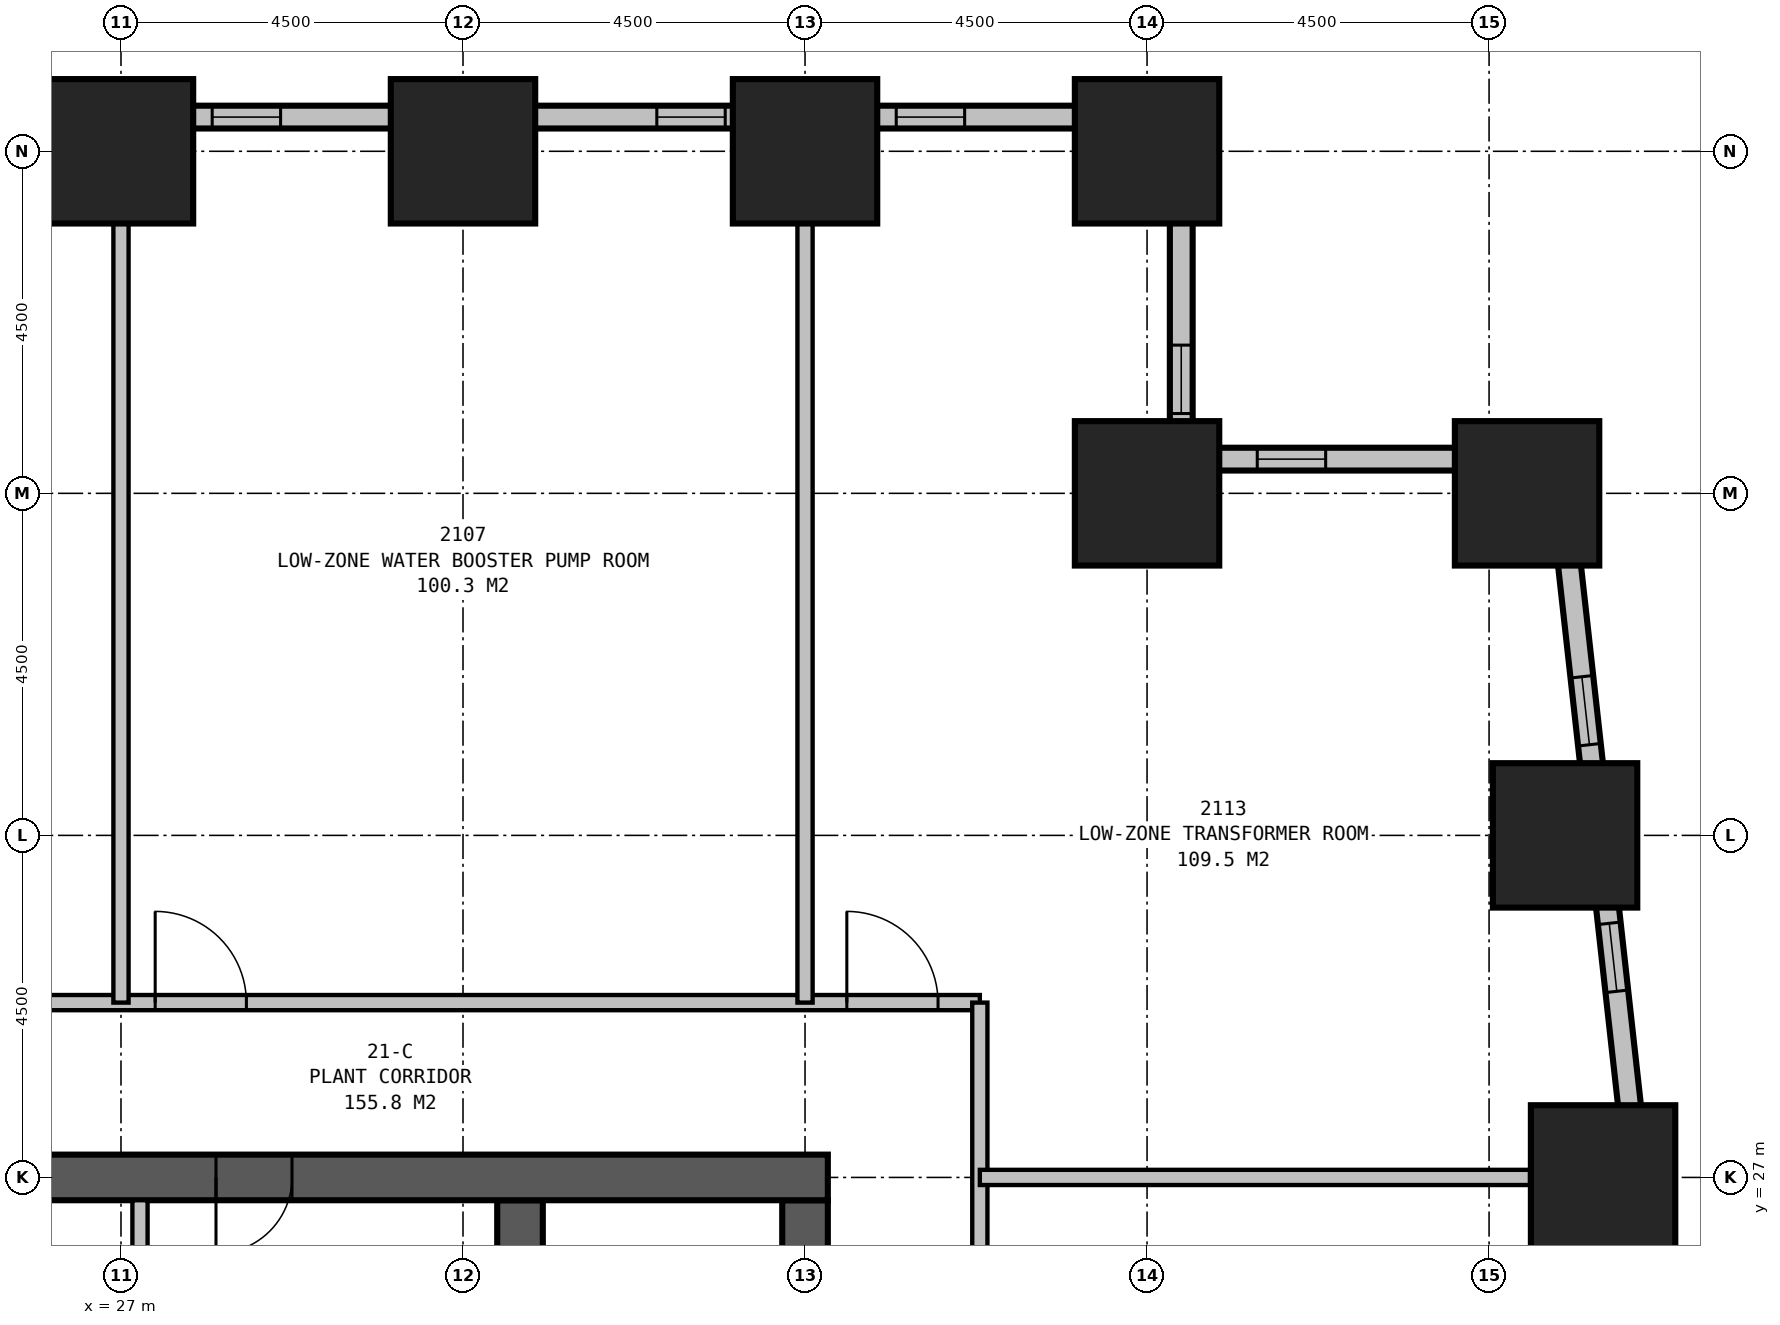
"""IFC4 building model, lengths in metres.
Left out: names, types, materials, properties, quantities, classifications, styles, units other than length and angle.
Written with IfcOpenShell. Run it as: python <this file> out.ifc"""

import sys

from ifc_helpers import new_model, si_unit, direction, frame, frame_2d, origin, origin_2d, place, context, subcontext, project, spatial, rectangle, extrude, element, fill, save


model = new_model("IFC4")
c1 = context("Model", 3, precision=1e-05, world=origin(), true_north=direction((0.0, 1.0)))
c2 = subcontext(c1, "Body", "Model", "MODEL_VIEW")
j1 = project(units=[si_unit("LENGTHUNIT", "METRE"), si_unit("PLANEANGLEUNIT", "RADIAN")], contexts=[c1])
p1 = place(None, origin())
s1 = spatial("IfcSite", under=j1, at=p1, CompositionType="ELEMENT")
p2 = place(p1, origin())
s2 = spatial("IfcBuilding", under=s1, at=p2, CompositionType="ELEMENT")
p3 = place(p2, frame((0.0, 0.0, 85.7)))
s3 = spatial("IfcBuildingStorey", under=s2, at=p3, CompositionType="ELEMENT", Elevation=85.7)
for number, where, z_axis, x_axis in (
    (1, (46.5, 27.0, 0.0), (0.0, 0.0, 1.0), (1.0, 0.0, 0.0)),
    (2, (46.0, 31.5, 0.0), (0.0, 0.0, 1.0), (1.0, 0.0, 0.0)),
    (3, (45.5, 36.0, 0.0), (0.0, 0.0, 1.0), (1.0, 0.0, 0.0)),
    (4, (40.5, 36.0, 0.0), (0.0, 0.0, 1.0), (1.0, 0.0, 0.0)),
    (5, (40.5, 40.5, 0.0), (0.0, 0.0, 1.0), (1.0, 0.0, 0.0)),
    (6, (36.0, 40.5, 0.0), (0.0, 0.0, 1.0), (1.0, 0.0, 0.0)),
    (7, (31.5, 40.5, 0.0), (0.0, 0.0, 1.0), (1.0, 0.0, 0.0)),
    (8, (27.0, 40.5, 0.0), (0.0, 0.0, 1.0), (1.0, 0.0, 0.0)),
):
    element("IfcColumn", number, at=place(p3, frame(where, z_axis=z_axis, x_axis=x_axis)), inside=s3, PredefinedType="COLUMN", context=c2, shape_type="SweptSolid", body=[
        extrude(rectangle(XDim=1.9, YDim=1.9, at=origin_2d()), origin(), (0.0, 0.0, 1.0), 4.2),
    ])
p4 = place(p3, frame((36.3, 27.0, 0.0), z_axis=(0.0, 0.0, 1.0), x_axis=(-1.0, 0.0, 0.0)))
e9 = element("IfcWall", 9, at=p4, inside=s3, PredefinedType="SHEAR", context=c2, shape_type="SweptSolid", body=[
    extrude(rectangle(XDim=23.1, YDim=0.6, at=frame_2d((11.55, 0.0))), origin(), (0.0, 0.0, 1.0), 4.2),
])
p5 = place(p4, frame((17.05, 0.0, 0.0)))
e10 = element("IfcOpeningElement", 10, at=p5, cuts=e9, PredefinedType="OPENING", context=c2, shape_type="SweptSolid", body=[
    extrude(rectangle(XDim=1.0, YDim=2.1, at=frame_2d((0.5, 1.05))), frame((0.0, 0.31, 0.0), z_axis=(0.0, -1.0, 0.0), x_axis=(1.0, 0.0, 0.0)), (0.0, 0.0, 1.0), 0.62),
])
p6 = place(p4, frame((12.05, 0.0, 0.0)))
e11 = element("IfcOpeningElement", 11, at=p6, cuts=e9, PredefinedType="OPENING", context=c2, shape_type="SweptSolid", body=[
    extrude(rectangle(XDim=1.0, YDim=2.1, at=frame_2d((0.5, 1.05))), frame((0.0, 0.31, 0.0), z_axis=(0.0, -1.0, 0.0), x_axis=(1.0, 0.0, 0.0)), (0.0, 0.0, 1.0), 0.62),
])
p7 = place(p4, frame((7.05, 0.0, 0.0)))
e12 = element("IfcOpeningElement", 12, at=p7, cuts=e9, PredefinedType="OPENING", context=c2, shape_type="SweptSolid", body=[
    extrude(rectangle(XDim=1.0, YDim=2.1, at=frame_2d((0.5, 1.05))), frame((0.0, 0.31, 0.0), z_axis=(0.0, -1.0, 0.0), x_axis=(1.0, 0.0, 0.0)), (0.0, 0.0, 1.0), 0.62),
])
p8 = place(p3, frame((32.25, 13.8, 0.0), z_axis=(0.0, 0.0, 1.0), x_axis=(0.0, 1.0, 0.0)))
e13 = element("IfcWall", 13, at=p8, inside=s3, PredefinedType="SHEAR", context=c2, shape_type="SweptSolid", body=[
    extrude(rectangle(XDim=12.9, YDim=0.6, at=frame_2d((6.45, 0.0))), origin(), (0.0, 0.0, 1.0), 4.2),
])
p9 = place(p8, frame((5.05, 0.0, 0.0), z_axis=(0.0, 0.0, 1.0), x_axis=(-1.0, 0.0, 0.0)))
e14 = element("IfcOpeningElement", 14, at=p9, cuts=e13, PredefinedType="OPENING", context=c2, shape_type="SweptSolid", body=[
    extrude(rectangle(XDim=1.2, YDim=2.1, at=frame_2d((0.6, 1.05))), frame((0.0, 0.31, 0.0), z_axis=(0.0, -1.0, 0.0), x_axis=(1.0, 0.0, 0.0)), (0.0, 0.0, 1.0), 0.62),
])
p10 = place(p3, frame((36.0, 20.0, 0.0), z_axis=(0.0, 0.0, 1.0), x_axis=(0.0, 1.0, 0.0)))
e15 = element("IfcWall", 15, at=p10, inside=s3, PredefinedType="SHEAR", context=c2, shape_type="SweptSolid", body=[
    extrude(rectangle(XDim=6.7, YDim=0.6, at=frame_2d((3.35, 0.0))), origin(), (0.0, 0.0, 1.0), 4.2),
])
p11 = place(p3, frame((49.519, 3.901, 0.0), z_axis=(0.0, 0.0, 1.0), x_axis=(-0.110429082637, 0.993884006164, 0.0)))
e16 = element("IfcWall", 16, at=p11, inside=s3, PredefinedType="STANDARD", context=c2, shape_type="SweptSolid", body=[
    extrude(rectangle(XDim=32.899, YDim=0.3, at=frame_2d((16.45, 0.0))), origin(), (0.0, 0.0, 1.0), 2.85),
])
p12 = place(p11, frame((1.803, 0.0, 0.5)))
e17 = element("IfcOpeningElement", 17, at=p12, cuts=e16, PredefinedType="OPENING", context=c2, shape_type="SweptSolid", body=[
    extrude(rectangle(XDim=0.9, YDim=1.2, at=frame_2d((0.45, 0.6))), frame((0.0, 0.16, 0.0), z_axis=(0.0, -1.0, 0.0), x_axis=(1.0, 0.0, 0.0)), (0.0, 0.0, 1.0), 0.32),
])
p13 = place(p11, frame((7.595, 0.0, 0.5)))
e18 = element("IfcOpeningElement", 18, at=p13, cuts=e16, PredefinedType="OPENING", context=c2, shape_type="SweptSolid", body=[
    extrude(rectangle(XDim=0.9, YDim=1.2, at=frame_2d((0.45, 0.6))), frame((0.0, 0.16, 0.0), z_axis=(0.0, -1.0, 0.0), x_axis=(1.0, 0.0, 0.0)), (0.0, 0.0, 1.0), 0.32),
])
p14 = place(p11, frame((10.858, 0.0, 0.5)))
e19 = element("IfcOpeningElement", 19, at=p14, cuts=e16, PredefinedType="OPENING", context=c2, shape_type="SweptSolid", body=[
    extrude(rectangle(XDim=0.9, YDim=1.2, at=frame_2d((0.45, 0.6))), frame((0.0, 0.16, 0.0), z_axis=(0.0, -1.0, 0.0), x_axis=(1.0, 0.0, 0.0)), (0.0, 0.0, 1.0), 0.32),
])
p15 = place(p11, frame((16.65, 0.0, 0.5)))
e20 = element("IfcOpeningElement", 20, at=p15, cuts=e16, PredefinedType="OPENING", context=c2, shape_type="SweptSolid", body=[
    extrude(rectangle(XDim=0.9, YDim=1.2, at=frame_2d((0.45, 0.6))), frame((0.0, 0.16, 0.0), z_axis=(0.0, -1.0, 0.0), x_axis=(1.0, 0.0, 0.0)), (0.0, 0.0, 1.0), 0.32),
])
p16 = place(p11, frame((19.914, 0.0, 0.5)))
e21 = element("IfcOpeningElement", 21, at=p16, cuts=e16, PredefinedType="OPENING", context=c2, shape_type="SweptSolid", body=[
    extrude(rectangle(XDim=0.9, YDim=1.2, at=frame_2d((0.45, 0.6))), frame((0.0, 0.16, 0.0), z_axis=(0.0, -1.0, 0.0), x_axis=(1.0, 0.0, 0.0)), (0.0, 0.0, 1.0), 0.32),
])
p17 = place(p11, frame((25.705, 0.0, 0.5)))
e22 = element("IfcOpeningElement", 22, at=p17, cuts=e16, PredefinedType="OPENING", context=c2, shape_type="SweptSolid", body=[
    extrude(rectangle(XDim=0.9, YDim=1.2, at=frame_2d((0.45, 0.6))), frame((0.0, 0.16, 0.0), z_axis=(0.0, -1.0, 0.0), x_axis=(1.0, 0.0, 0.0)), (0.0, 0.0, 1.0), 0.32),
])
p18 = place(p11, frame((28.969, 0.0, 0.5)))
e23 = element("IfcOpeningElement", 23, at=p18, cuts=e16, PredefinedType="OPENING", context=c2, shape_type="SweptSolid", body=[
    extrude(rectangle(XDim=0.9, YDim=1.2, at=frame_2d((0.45, 0.6))), frame((0.0, 0.16, 0.0), z_axis=(0.0, -1.0, 0.0), x_axis=(1.0, 0.0, 0.0)), (0.0, 0.0, 1.0), 0.32),
])
p19 = place(p3, frame((46.053, 36.45, 0.0), z_axis=(0.0, 0.0, 1.0), x_axis=(-1.0, 0.0, 0.0)))
e24 = element("IfcWall", 24, at=p19, inside=s3, PredefinedType="STANDARD", context=c2, shape_type="SweptSolid", body=[
    extrude(rectangle(XDim=5.253, YDim=0.3, at=frame_2d((2.626, 0.0))), origin(), (0.0, 0.0, 1.0), 2.85),
])
p20 = place(p19, frame((3.203, 0.0, 0.5)))
e25 = element("IfcOpeningElement", 25, at=p20, cuts=e24, PredefinedType="OPENING", context=c2, shape_type="SweptSolid", body=[
    extrude(rectangle(XDim=0.9, YDim=1.2, at=frame_2d((0.45, 0.6))), frame((0.0, 0.16, 0.0), z_axis=(0.0, -1.0, 0.0), x_axis=(1.0, 0.0, 0.0)), (0.0, 0.0, 1.0), 0.32),
])
p21 = place(p3, frame((40.95, 36.3, 0.0), z_axis=(0.0, 0.0, 1.0), x_axis=(0.0, 1.0, 0.0)))
e26 = element("IfcWall", 26, at=p21, inside=s3, PredefinedType="STANDARD", context=c2, shape_type="SweptSolid", body=[
    extrude(rectangle(XDim=4.8, YDim=0.3, at=frame_2d((2.4, 0.0))), origin(), (0.0, 0.0, 1.0), 2.85),
])
p22 = place(p21, frame((0.75, 0.0, 0.5)))
e27 = element("IfcOpeningElement", 27, at=p22, cuts=e26, PredefinedType="OPENING", context=c2, shape_type="SweptSolid", body=[
    extrude(rectangle(XDim=0.9, YDim=1.2, at=frame_2d((0.45, 0.6))), frame((0.0, 0.16, 0.0), z_axis=(0.0, -1.0, 0.0), x_axis=(1.0, 0.0, 0.0)), (0.0, 0.0, 1.0), 0.32),
])
p23 = place(p3, frame((41.1, 40.95, 0.0), z_axis=(0.0, 0.0, 1.0), x_axis=(-1.0, 0.0, 0.0)))
e28 = element("IfcWall", 28, at=p23, inside=s3, PredefinedType="STANDARD", context=c2, shape_type="SweptSolid", body=[
    extrude(rectangle(XDim=32.7, YDim=0.3, at=frame_2d((16.35, 0.0))), origin(), (0.0, 0.0, 1.0), 2.85),
])
p24 = place(p23, frame((3.0, 0.0, 0.5)))
e29 = element("IfcOpeningElement", 29, at=p24, cuts=e28, PredefinedType="OPENING", context=c2, shape_type="SweptSolid", body=[
    extrude(rectangle(XDim=0.9, YDim=1.2, at=frame_2d((0.45, 0.6))), frame((0.0, 0.16, 0.0), z_axis=(0.0, -1.0, 0.0), x_axis=(1.0, 0.0, 0.0)), (0.0, 0.0, 1.0), 0.32),
])
p25 = place(p23, frame((6.15, 0.0, 0.5)))
e30 = element("IfcOpeningElement", 30, at=p25, cuts=e28, PredefinedType="OPENING", context=c2, shape_type="SweptSolid", body=[
    extrude(rectangle(XDim=0.9, YDim=1.2, at=frame_2d((0.45, 0.6))), frame((0.0, 0.16, 0.0), z_axis=(0.0, -1.0, 0.0), x_axis=(1.0, 0.0, 0.0)), (0.0, 0.0, 1.0), 0.32),
])
p26 = place(p23, frame((12.0, 0.0, 0.5)))
e31 = element("IfcOpeningElement", 31, at=p26, cuts=e28, PredefinedType="OPENING", context=c2, shape_type="SweptSolid", body=[
    extrude(rectangle(XDim=0.9, YDim=1.2, at=frame_2d((0.45, 0.6))), frame((0.0, 0.16, 0.0), z_axis=(0.0, -1.0, 0.0), x_axis=(1.0, 0.0, 0.0)), (0.0, 0.0, 1.0), 0.32),
])
p27 = place(p23, frame((15.15, 0.0, 0.5)))
e32 = element("IfcOpeningElement", 32, at=p27, cuts=e28, PredefinedType="OPENING", context=c2, shape_type="SweptSolid", body=[
    extrude(rectangle(XDim=0.9, YDim=1.2, at=frame_2d((0.45, 0.6))), frame((0.0, 0.16, 0.0), z_axis=(0.0, -1.0, 0.0), x_axis=(1.0, 0.0, 0.0)), (0.0, 0.0, 1.0), 0.32),
])
p28 = place(p23, frame((21.0, 0.0, 0.5)))
e33 = element("IfcOpeningElement", 33, at=p28, cuts=e28, PredefinedType="OPENING", context=c2, shape_type="SweptSolid", body=[
    extrude(rectangle(XDim=0.9, YDim=1.2, at=frame_2d((0.45, 0.6))), frame((0.0, 0.16, 0.0), z_axis=(0.0, -1.0, 0.0), x_axis=(1.0, 0.0, 0.0)), (0.0, 0.0, 1.0), 0.32),
])
p29 = place(p23, frame((24.2, 0.0, 0.5)))
e34 = element("IfcOpeningElement", 34, at=p29, cuts=e28, PredefinedType="OPENING", context=c2, shape_type="SweptSolid", body=[
    extrude(rectangle(XDim=0.9, YDim=1.2, at=frame_2d((0.45, 0.6))), frame((0.0, 0.16, 0.0), z_axis=(0.0, -1.0, 0.0), x_axis=(1.0, 0.0, 0.0)), (0.0, 0.0, 1.0), 0.32),
])
p30 = place(p23, frame((30.0, 0.0, 0.5)))
e35 = element("IfcOpeningElement", 35, at=p30, cuts=e28, PredefinedType="OPENING", context=c2, shape_type="SweptSolid", body=[
    extrude(rectangle(XDim=0.9, YDim=1.2, at=frame_2d((0.45, 0.6))), frame((0.0, 0.16, 0.0), z_axis=(0.0, -1.0, 0.0), x_axis=(1.0, 0.0, 0.0)), (0.0, 0.0, 1.0), 0.32),
])
p31 = place(p3, frame((38.3, 11.2, 0.0), z_axis=(0.0, 0.0, 1.0), x_axis=(0.0, 1.0, 0.0)))
e36 = element("IfcWall", 36, at=p31, inside=s3, PredefinedType="PARTITIONING", context=c2, shape_type="SweptSolid", body=[
    extrude(rectangle(XDim=18.1, YDim=0.2, at=frame_2d((9.05, 0.0))), origin(), (0.0, 0.0, 1.0), 3.95),
])
p32 = place(p31, frame((3.75, 0.0, 0.0), z_axis=(0.0, 0.0, 1.0), x_axis=(-1.0, 0.0, 0.0)))
e37 = element("IfcOpeningElement", 37, at=p32, cuts=e36, PredefinedType="OPENING", context=c2, shape_type="SweptSolid", body=[
    extrude(rectangle(XDim=1.0, YDim=2.1, at=frame_2d((0.5, 1.05))), frame((0.0, 0.11, 0.0), z_axis=(0.0, -1.0, 0.0), x_axis=(1.0, 0.0, 0.0)), (0.0, 0.0, 1.0), 0.22),
])
p33 = place(p31, frame((8.45, 0.0, 0.0), z_axis=(0.0, 0.0, 1.0), x_axis=(-1.0, 0.0, 0.0)))
e38 = element("IfcOpeningElement", 38, at=p33, cuts=e36, PredefinedType="OPENING", context=c2, shape_type="SweptSolid", body=[
    extrude(rectangle(XDim=1.2, YDim=2.1, at=frame_2d((0.6, 1.05))), frame((0.0, 0.11, 0.0), z_axis=(0.0, -1.0, 0.0), x_axis=(1.0, 0.0, 0.0)), (0.0, 0.0, 1.0), 0.22),
])
p34 = place(p3, frame((11.2, 29.3, 0.0), z_axis=(0.0, 0.0, 1.0), x_axis=(1.0, 0.0, 0.0)))
e39 = element("IfcWall", 39, at=p34, inside=s3, PredefinedType="PARTITIONING", context=c2, shape_type="SweptSolid", body=[
    extrude(rectangle(XDim=27.1, YDim=0.2, at=frame_2d((13.55, 0.0))), origin(), (0.0, 0.0, 1.0), 3.95),
])
p35 = place(p34, frame((2.75, 0.0, 0.0)))
e40 = element("IfcOpeningElement", 40, at=p35, cuts=e39, PredefinedType="OPENING", context=c2, shape_type="SweptSolid", body=[
    extrude(rectangle(XDim=1.2, YDim=2.1, at=frame_2d((0.6, 1.05))), frame((0.0, 0.11, 0.0), z_axis=(0.0, -1.0, 0.0), x_axis=(1.0, 0.0, 0.0)), (0.0, 0.0, 1.0), 0.22),
])
p36 = place(p34, frame((16.25, 0.0, 0.0)))
e41 = element("IfcOpeningElement", 41, at=p36, cuts=e39, PredefinedType="OPENING", context=c2, shape_type="SweptSolid", body=[
    extrude(rectangle(XDim=1.2, YDim=2.1, at=frame_2d((0.6, 1.05))), frame((0.0, 0.11, 0.0), z_axis=(0.0, -1.0, 0.0), x_axis=(1.0, 0.0, 0.0)), (0.0, 0.0, 1.0), 0.22),
])
p37 = place(p34, frame((0.55, 0.0, 0.0)))
e42 = element("IfcOpeningElement", 42, at=p37, cuts=e39, PredefinedType="OPENING", context=c2, shape_type="SweptSolid", body=[
    extrude(rectangle(XDim=1.2, YDim=2.1, at=frame_2d((0.6, 1.05))), frame((0.0, 0.11, 0.0), z_axis=(0.0, -1.0, 0.0), x_axis=(1.0, 0.0, 0.0)), (0.0, 0.0, 1.0), 0.22),
])
p38 = place(p34, frame((25.35, 0.0, 0.0)))
e43 = element("IfcOpeningElement", 43, at=p38, cuts=e39, PredefinedType="OPENING", context=c2, shape_type="SweptSolid", body=[
    extrude(rectangle(XDim=1.2, YDim=2.1, at=frame_2d((0.6, 1.05))), frame((0.0, 0.11, 0.0), z_axis=(0.0, -1.0, 0.0), x_axis=(1.0, 0.0, 0.0)), (0.0, 0.0, 1.0), 0.22),
])
p39 = place(p3, frame((38.3, 27.0, 0.0), z_axis=(0.0, 0.0, 1.0), x_axis=(1.0, 0.0, 0.0)))
e44 = element("IfcWall", 44, at=p39, inside=s3, PredefinedType="PARTITIONING", context=c2, shape_type="SweptSolid", body=[
    extrude(rectangle(XDim=7.239, YDim=0.2, at=frame_2d((3.62, 0.0))), origin(), (0.0, 0.0, 1.0), 2.65),
])
for number, where, z_axis, x_axis in (
    (45, (27.0, 29.3, 0.0), (0.0, 0.0, 1.0), (0.0, 1.0, 0.0)),
    (46, (36.0, 29.3, 0.0), (0.0, 0.0, 1.0), (0.0, 1.0, 0.0)),
):
    element("IfcWall", number, at=place(p3, frame(where, z_axis=z_axis, x_axis=x_axis)), inside=s3, PredefinedType="PARTITIONING", context=c2, shape_type="SweptSolid", body=[
        extrude(rectangle(XDim=10.25, YDim=0.2, at=frame_2d((5.125, 0.0))), origin(), (0.0, 0.0, 1.0), 2.95),
    ])
p40 = place(p3, frame((27.25, 23.6, 0.0), z_axis=(0.0, 0.0, 1.0), x_axis=(0.0, 1.0, 0.0)))
e47 = element("IfcWall", 47, at=p40, inside=s3, PredefinedType="PARTITIONING", context=c2, shape_type="SweptSolid", body=[
    extrude(rectangle(XDim=3.1, YDim=0.2, at=frame_2d((1.55, 0.0))), origin(), (0.0, 0.0, 1.0), 3.95),
])
p41 = place(p17, origin())
e48 = element("IfcWindow", 48, at=p41, inside=s3, PartitioningType="SINGLE_PANEL", PredefinedType="USERDEFINED", context=c2, shape_type="SweptSolid", body=[
    extrude(rectangle(XDim=0.9, YDim=1.2, at=frame_2d((0.45, 0.6))), frame((0.0, 0.03, 0.0), z_axis=(0.0, -1.0, 0.0), x_axis=(1.0, 0.0, 0.0)), (0.0, 0.0, 1.0), 0.06),
])
fill(e22, e48)
p42 = place(p18, origin())
e49 = element("IfcWindow", 49, at=p42, inside=s3, PartitioningType="SINGLE_PANEL", PredefinedType="USERDEFINED", context=c2, shape_type="SweptSolid", body=[
    extrude(rectangle(XDim=0.9, YDim=1.2, at=frame_2d((0.45, 0.6))), frame((0.0, 0.03, 0.0), z_axis=(0.0, -1.0, 0.0), x_axis=(1.0, 0.0, 0.0)), (0.0, 0.0, 1.0), 0.06),
])
fill(e23, e49)
p43 = place(p20, origin())
e50 = element("IfcWindow", 50, at=p43, inside=s3, PartitioningType="SINGLE_PANEL", PredefinedType="USERDEFINED", context=c2, shape_type="SweptSolid", body=[
    extrude(rectangle(XDim=0.9, YDim=1.2, at=frame_2d((0.45, 0.6))), frame((0.0, 0.03, 0.0), z_axis=(0.0, -1.0, 0.0), x_axis=(1.0, 0.0, 0.0)), (0.0, 0.0, 1.0), 0.06),
])
fill(e25, e50)
p44 = place(p22, origin())
e51 = element("IfcWindow", 51, at=p44, inside=s3, PartitioningType="SINGLE_PANEL", PredefinedType="USERDEFINED", context=c2, shape_type="SweptSolid", body=[
    extrude(rectangle(XDim=0.9, YDim=1.2, at=frame_2d((0.45, 0.6))), frame((0.0, 0.03, 0.0), z_axis=(0.0, -1.0, 0.0), x_axis=(1.0, 0.0, 0.0)), (0.0, 0.0, 1.0), 0.06),
])
fill(e27, e51)
p45 = place(p24, origin())
e52 = element("IfcWindow", 52, at=p45, inside=s3, PartitioningType="SINGLE_PANEL", PredefinedType="USERDEFINED", context=c2, shape_type="SweptSolid", body=[
    extrude(rectangle(XDim=0.9, YDim=1.2, at=frame_2d((0.45, 0.6))), frame((0.0, 0.03, 0.0), z_axis=(0.0, -1.0, 0.0), x_axis=(1.0, 0.0, 0.0)), (0.0, 0.0, 1.0), 0.06),
])
fill(e29, e52)
p46 = place(p25, origin())
e53 = element("IfcWindow", 53, at=p46, inside=s3, PartitioningType="SINGLE_PANEL", PredefinedType="USERDEFINED", context=c2, shape_type="SweptSolid", body=[
    extrude(rectangle(XDim=0.9, YDim=1.2, at=frame_2d((0.45, 0.6))), frame((0.0, 0.03, 0.0), z_axis=(0.0, -1.0, 0.0), x_axis=(1.0, 0.0, 0.0)), (0.0, 0.0, 1.0), 0.06),
])
fill(e30, e53)
p47 = place(p26, origin())
e54 = element("IfcWindow", 54, at=p47, inside=s3, PartitioningType="SINGLE_PANEL", PredefinedType="USERDEFINED", context=c2, shape_type="SweptSolid", body=[
    extrude(rectangle(XDim=0.9, YDim=1.2, at=frame_2d((0.45, 0.6))), frame((0.0, 0.03, 0.0), z_axis=(0.0, -1.0, 0.0), x_axis=(1.0, 0.0, 0.0)), (0.0, 0.0, 1.0), 0.06),
])
fill(e31, e54)
p48 = place(p36, origin())
e55 = element("IfcDoor", 55, at=p48, inside=s3, OperationType="SINGLE_SWING_LEFT", PredefinedType="DOOR", context=c2, shape_type="SweptSolid", body=[
    extrude(rectangle(XDim=1.2, YDim=2.1, at=frame_2d((0.6, 1.05))), frame((0.0, 0.025, 0.0), z_axis=(0.0, -1.0, 0.0), x_axis=(1.0, 0.0, 0.0)), (0.0, 0.0, 1.0), 0.05),
])
fill(e41, e55)
p49 = place(p38, origin())
e56 = element("IfcDoor", 56, at=p49, inside=s3, OperationType="SINGLE_SWING_LEFT", PredefinedType="DOOR", context=c2, shape_type="SweptSolid", body=[
    extrude(rectangle(XDim=1.2, YDim=2.1, at=frame_2d((0.6, 1.05))), frame((0.0, 0.025, 0.0), z_axis=(0.0, -1.0, 0.0), x_axis=(1.0, 0.0, 0.0)), (0.0, 0.0, 1.0), 0.05),
])
fill(e43, e56)
p50 = place(p7, origin())
e57 = element("IfcDoor", 57, at=p50, inside=s3, OperationType="SINGLE_SWING_RIGHT", PredefinedType="DOOR", context=c2, shape_type="SweptSolid", body=[
    extrude(rectangle(XDim=1.0, YDim=2.1, at=frame_2d((0.5, 1.05))), frame((0.0, 0.3, 0.0), z_axis=(0.0, -1.0, 0.0), x_axis=(1.0, 0.0, 0.0)), (0.0, 0.0, 1.0), 0.6),
])
fill(e12, e57)
save(model, sys.argv[1])
